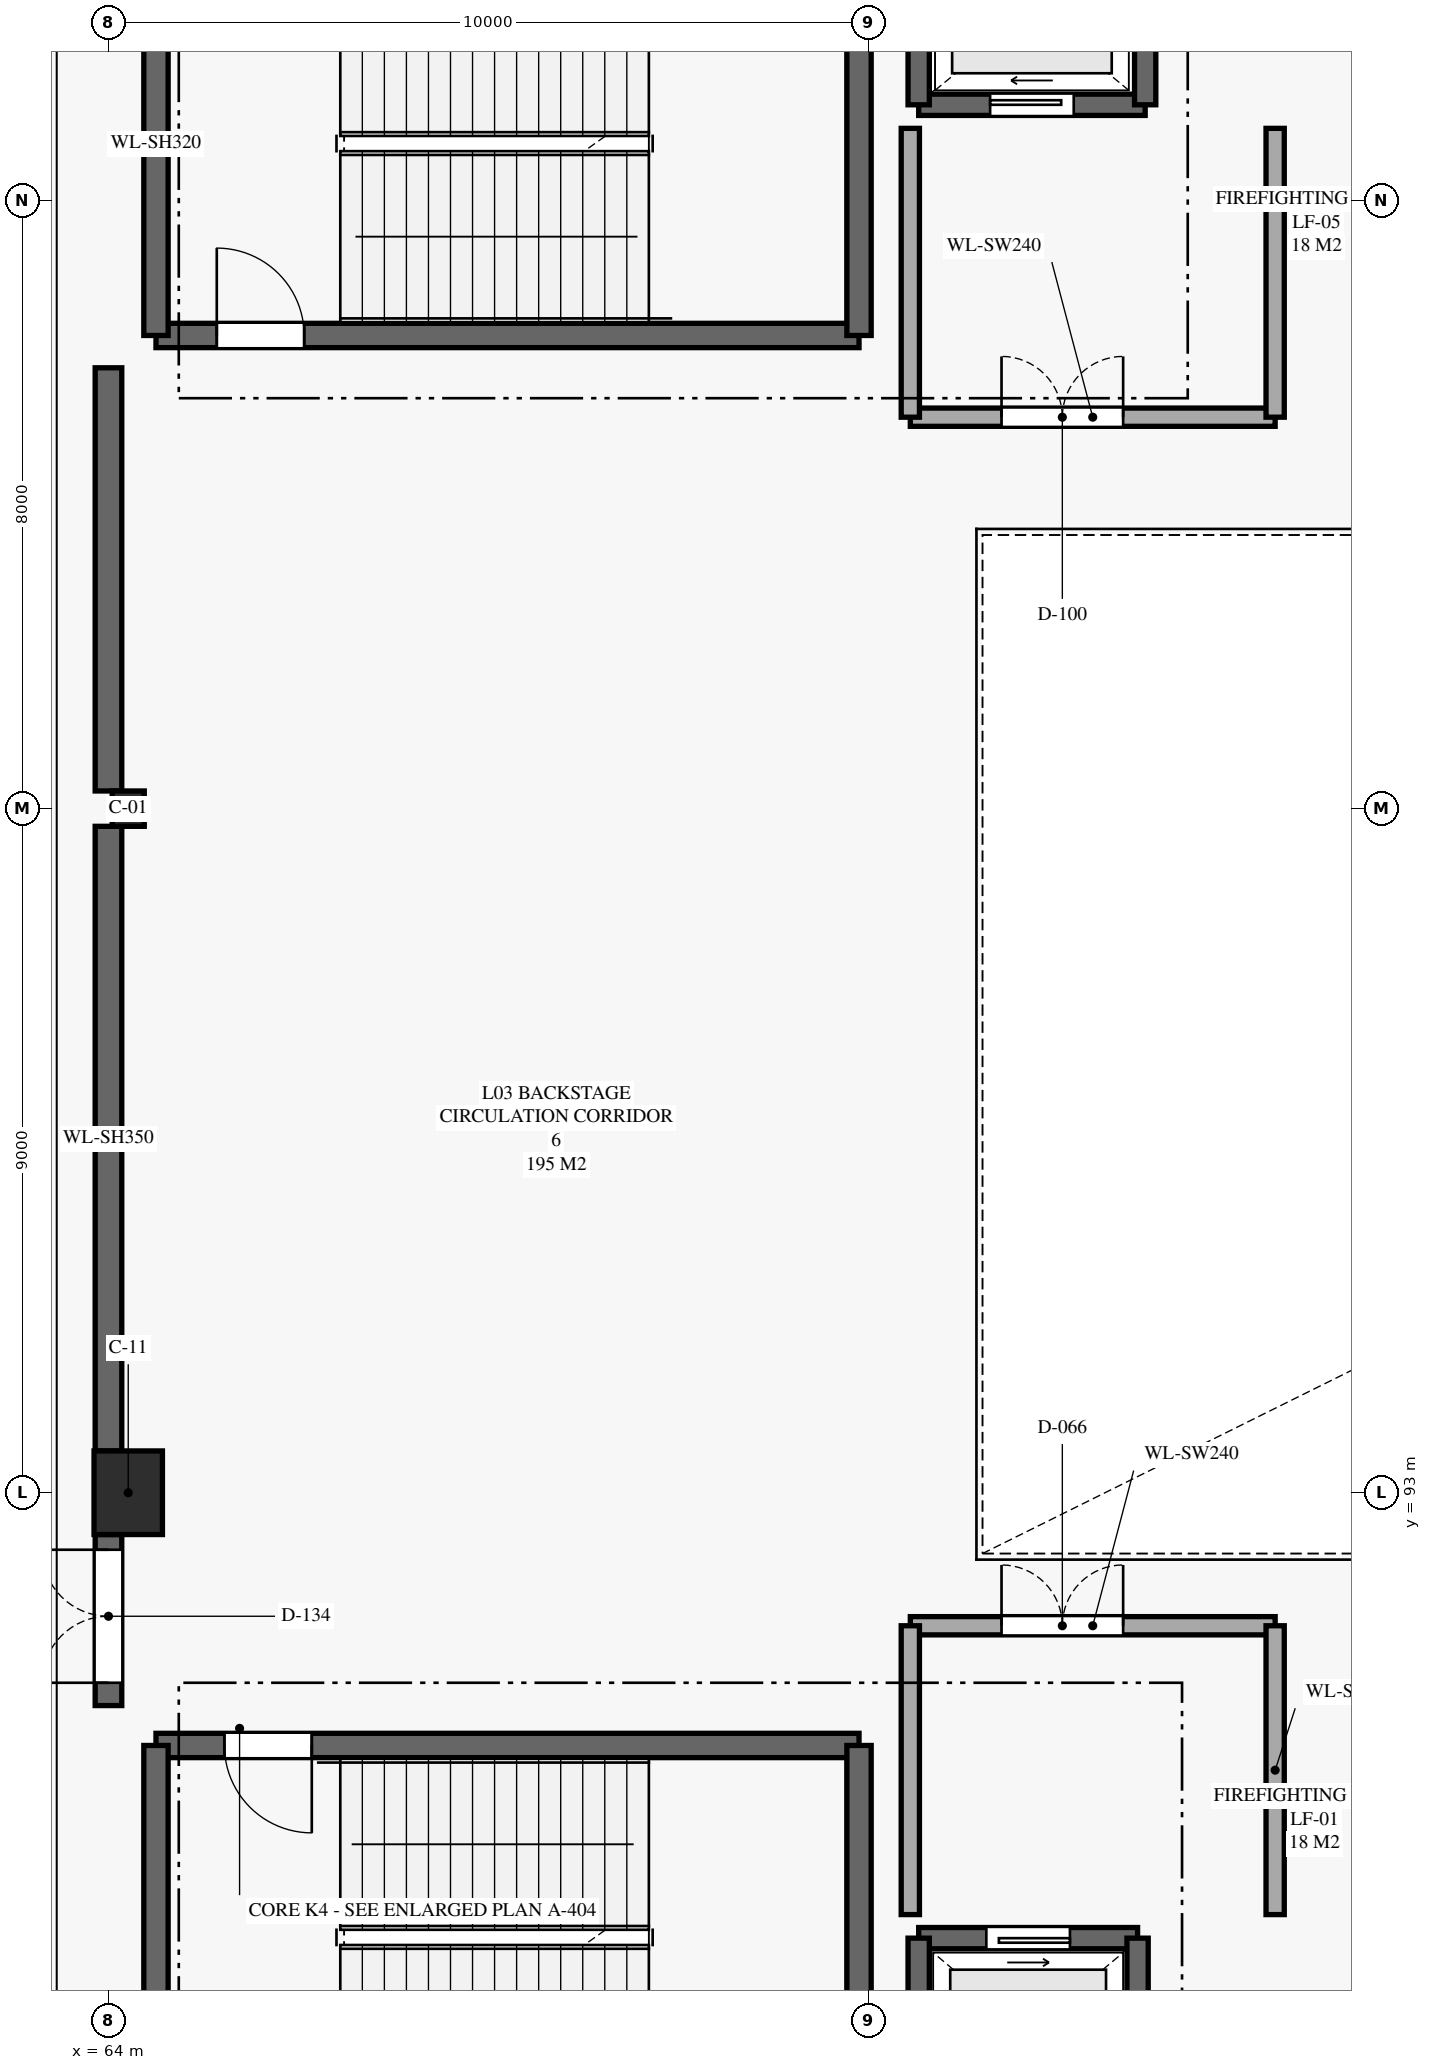
"""IFC4 building model, lengths in metres.
Left out: names, types, materials, properties, quantities, classifications, styles, units other than length and angle.
Written with IfcOpenShell. Run it as: python <this file> out.ifc"""

import sys

from ifc_helpers import new_model, si_unit, direction, frame, frame_2d, origin, origin_2d, place, context, subcontext, project, spatial, rectangle, i_section, extrude, element, fill, save


model = new_model("IFC4")
c1 = context("Model", 3, precision=1e-05, world=origin(), true_north=direction((0.0, 1.0)))
c2 = subcontext(c1, "Body", "Model", "MODEL_VIEW")
j1 = project(units=[si_unit("LENGTHUNIT", "METRE"), si_unit("PLANEANGLEUNIT", "RADIAN")], contexts=[c1])
p1 = place(None, origin())
s1 = spatial("IfcSite", under=j1, at=p1, CompositionType="ELEMENT")
p2 = place(p1, origin())
s2 = spatial("IfcBuilding", under=s1, at=p2, CompositionType="ELEMENT")
p3 = place(p2, frame((0.0, 0.0, 15.0)))
s3 = spatial("IfcBuildingStorey", under=s2, at=p3, CompositionType="ELEMENT", Elevation=15.0)
p4 = place(p3, frame((64.26, 93.0, 0.0), z_axis=(0.0, 0.0, 1.0), x_axis=(1.0, 0.0, 0.0)))
e1 = element("IfcColumn", 1, at=p4, inside=s3, PredefinedType="COLUMN", context=c2, shape_type="SweptSolid", body=[
    extrude(rectangle(XDim=0.9, YDim=1.1, at=origin_2d()), origin(), (0.0, 0.0, 1.0), 5.0),
])
p5 = place(p3, frame((64.26, 102.0, 0.0), z_axis=(0.0, 0.0, 1.0), x_axis=(1.0, 0.0, 0.0)))
e2 = element("IfcColumn", 2, at=p5, inside=s3, PredefinedType="COLUMN", context=c2, shape_type="SweptSolid", body=[
    extrude(i_section(OverallWidth=0.422, OverallDepth=0.465, WebThickness=0.045, FlangeThickness=0.073, FilletRadius=0.02, at=origin_2d()), origin(), (0.0, 0.0, 1.0), 5.0),
])
p6 = place(p3, frame((64.625, 108.225, 0.0), z_axis=(0.0, 0.0, 1.0), x_axis=(1.0, 0.0, 0.0)))
e3 = element("IfcWall", 3, at=p6, inside=s3, PredefinedType="SHEAR", context=c2, shape_type="SweptSolid", body=[
    extrude(rectangle(XDim=9.25, YDim=0.32, at=frame_2d((4.625, 0.0))), origin(), (0.0, 0.0, 1.0), 4.675),
])
p7 = place(p6, frame((0.8, 0.0, 0.0)))
e4 = element("IfcOpeningElement", 4, at=p7, cuts=e3, PredefinedType="OPENING", context=c2, shape_type="SweptSolid", body=[
    extrude(rectangle(XDim=1.15, YDim=2.2, at=frame_2d((0.575, 1.1))), frame((0.0, 0.17, 0.0), z_axis=(0.0, -1.0, 0.0), x_axis=(1.0, 0.0, 0.0)), (0.0, 0.0, 1.0), 0.34),
])
for number, where, z_axis, x_axis in (
    (5, (64.625, 113.275, 0.0), (0.0, 0.0, 1.0), (0.0, -1.0, 0.0)),
    (6, (73.875, 108.225, 0.0), (0.0, 0.0, 1.0), (0.0, 1.0, 0.0)),
):
    element("IfcWall", number, at=place(p3, frame(where, z_axis=z_axis, x_axis=x_axis)), inside=s3, PredefinedType="SHEAR", context=c2, shape_type="SweptSolid", body=[
        extrude(rectangle(XDim=5.05, YDim=0.32, at=frame_2d((2.525, 0.0))), origin(), (0.0, 0.0, 1.0), 4.675),
    ])
p8 = place(p3, frame((73.875, 89.675, 0.0), z_axis=(0.0, 0.0, 1.0), x_axis=(-1.0, 0.0, 0.0)))
e7 = element("IfcWall", 7, at=p8, inside=s3, PredefinedType="SHEAR", context=c2, shape_type="SweptSolid", body=[
    extrude(rectangle(XDim=9.25, YDim=0.32, at=frame_2d((4.625, 0.0))), origin(), (0.0, 0.0, 1.0), 4.675),
])
p9 = place(p8, frame((7.2, 0.0, 0.0)))
e8 = element("IfcOpeningElement", 8, at=p9, cuts=e7, PredefinedType="OPENING", context=c2, shape_type="SweptSolid", body=[
    extrude(rectangle(XDim=1.15, YDim=2.2, at=frame_2d((0.575, 1.1))), frame((0.0, 0.17, 0.0), z_axis=(0.0, -1.0, 0.0), x_axis=(1.0, 0.0, 0.0)), (0.0, 0.0, 1.0), 0.34),
])
for number, where, z_axis, x_axis in (
    (9, (64.625, 89.675, 0.0), (0.0, 0.0, 1.0), (0.0, -1.0, 0.0)),
    (10, (73.875, 84.625, 0.0), (0.0, 0.0, 1.0), (0.0, 1.0, 0.0)),
):
    element("IfcWall", number, at=place(p3, frame(where, z_axis=z_axis, x_axis=x_axis)), inside=s3, PredefinedType="SHEAR", context=c2, shape_type="SweptSolid", body=[
        extrude(rectangle(XDim=5.05, YDim=0.32, at=frame_2d((2.525, 0.0))), origin(), (0.0, 0.0, 1.0), 4.675),
    ])
p10 = place(p3, frame((77.54, 87.14, 0.0), z_axis=(0.0, 0.0, 1.0), x_axis=(-1.0, 0.0, 0.0)))
e11 = element("IfcWall", 11, at=p10, inside=s3, PredefinedType="SHEAR", context=c2, shape_type="SweptSolid", body=[
    extrude(rectangle(XDim=2.88, YDim=0.28, at=frame_2d((1.44, 0.0))), origin(), (0.0, 0.0, 1.0), 4.675),
])
p11 = place(p10, frame((0.89, 0.0, 0.0)))
e12 = element("IfcOpeningElement", 12, at=p11, cuts=e11, PredefinedType="OPENING", context=c2, shape_type="SweptSolid", body=[
    extrude(rectangle(XDim=1.1, YDim=2.2, at=frame_2d((0.55, 1.1))), frame((0.0, 0.15, 0.0), z_axis=(0.0, -1.0, 0.0), x_axis=(1.0, 0.0, 0.0)), (0.0, 0.0, 1.0), 0.3),
])
for number, where, z_axis, x_axis in (
    (13, (74.66, 87.14, 0.0), (0.0, 0.0, 1.0), (0.0, -1.0, 0.0)),
    (14, (77.54, 84.66, 0.0), (0.0, 0.0, 1.0), (0.0, 1.0, 0.0)),
):
    element("IfcWall", number, at=place(p3, frame(where, z_axis=z_axis, x_axis=x_axis)), inside=s3, PredefinedType="SHEAR", context=c2, shape_type="SweptSolid", body=[
        extrude(rectangle(XDim=2.48, YDim=0.28, at=frame_2d((1.24, 0.0))), origin(), (0.0, 0.0, 1.0), 4.675),
    ])
p12 = place(p3, frame((74.55, 91.25, 0.0), z_axis=(0.0, 0.0, 1.0), x_axis=(1.0, 0.0, 0.0)))
e15 = element("IfcWall", 15, at=p12, inside=s3, PredefinedType="SOLIDWALL", context=c2, shape_type="SweptSolid", body=[
    extrude(rectangle(XDim=4.8, YDim=0.24, at=frame_2d((2.4, 0.0))), origin(), (0.0, 0.0, 1.0), 4.675),
])
p13 = place(p12, frame((1.2, 0.0, 0.0)))
e16 = element("IfcOpeningElement", 16, at=p13, cuts=e15, PredefinedType="OPENING", context=c2, shape_type="SweptSolid", body=[
    extrude(rectangle(XDim=1.6, YDim=2.2, at=frame_2d((0.8, 1.1))), frame((0.0, 0.13, 0.0), z_axis=(0.0, -1.0, 0.0), x_axis=(1.0, 0.0, 0.0)), (0.0, 0.0, 1.0), 0.26),
])
for number, where, z_axis, x_axis in (
    (17, (74.55, 91.25, 0.0), (0.0, 0.0, 1.0), (0.0, -1.0, 0.0)),
    (18, (79.35, 87.45, 0.0), (0.0, 0.0, 1.0), (0.0, 1.0, 0.0)),
):
    element("IfcWall", number, at=place(p3, frame(where, z_axis=z_axis, x_axis=x_axis)), inside=s3, PredefinedType="SOLIDWALL", context=c2, shape_type="SweptSolid", body=[
        extrude(rectangle(XDim=3.8, YDim=0.24, at=frame_2d((1.9, 0.0))), origin(), (0.0, 0.0, 1.0), 4.675),
    ])
p14 = place(p3, frame((74.66, 111.26, 0.0), z_axis=(0.0, 0.0, 1.0), x_axis=(1.0, 0.0, 0.0)))
e19 = element("IfcWall", 19, at=p14, inside=s3, PredefinedType="SHEAR", context=c2, shape_type="SweptSolid", body=[
    extrude(rectangle(XDim=2.98, YDim=0.28, at=frame_2d((1.49, 0.0))), origin(), (0.0, 0.0, 1.0), 4.675),
])
p15 = place(p14, frame((0.94, 0.0, 0.0)))
e20 = element("IfcOpeningElement", 20, at=p15, cuts=e19, PredefinedType="OPENING", context=c2, shape_type="SweptSolid", body=[
    extrude(rectangle(XDim=1.1, YDim=2.2, at=frame_2d((0.55, 1.1))), frame((0.0, 0.15, 0.0), z_axis=(0.0, -1.0, 0.0), x_axis=(1.0, 0.0, 0.0)), (0.0, 0.0, 1.0), 0.3),
])
for number, where, z_axis, x_axis in (
    (21, (74.66, 113.74, 0.0), (0.0, 0.0, 1.0), (0.0, -1.0, 0.0)),
    (22, (77.64, 111.26, 0.0), (0.0, 0.0, 1.0), (0.0, 1.0, 0.0)),
):
    element("IfcWall", number, at=place(p3, frame(where, z_axis=z_axis, x_axis=x_axis)), inside=s3, PredefinedType="SHEAR", context=c2, shape_type="SweptSolid", body=[
        extrude(rectangle(XDim=2.48, YDim=0.28, at=frame_2d((1.24, 0.0))), origin(), (0.0, 0.0, 1.0), 4.675),
    ])
p16 = place(p3, frame((74.55, 107.15, 0.0), z_axis=(0.0, 0.0, 1.0), x_axis=(1.0, 0.0, 0.0)))
e23 = element("IfcWall", 23, at=p16, inside=s3, PredefinedType="SOLIDWALL", context=c2, shape_type="SweptSolid", body=[
    extrude(rectangle(XDim=4.8, YDim=0.24, at=frame_2d((2.4, 0.0))), origin(), (0.0, 0.0, 1.0), 4.675),
])
p17 = place(p16, frame((1.2, 0.0, 0.0)))
e24 = element("IfcOpeningElement", 24, at=p17, cuts=e23, PredefinedType="OPENING", context=c2, shape_type="SweptSolid", body=[
    extrude(rectangle(XDim=1.6, YDim=2.2, at=frame_2d((0.8, 1.1))), frame((0.0, 0.13, 0.0), z_axis=(0.0, -1.0, 0.0), x_axis=(1.0, 0.0, 0.0)), (0.0, 0.0, 1.0), 0.26),
])
for number, where, z_axis, x_axis in (
    (25, (74.55, 110.95, 0.0), (0.0, 0.0, 1.0), (0.0, -1.0, 0.0)),
    (26, (79.35, 107.15, 0.0), (0.0, 0.0, 1.0), (0.0, 1.0, 0.0)),
):
    element("IfcWall", number, at=place(p3, frame(where, z_axis=z_axis, x_axis=x_axis)), inside=s3, PredefinedType="SOLIDWALL", context=c2, shape_type="SweptSolid", body=[
        extrude(rectangle(XDim=3.8, YDim=0.24, at=frame_2d((1.9, 0.0))), origin(), (0.0, 0.0, 1.0), 4.675),
    ])
p18 = place(p3, frame((64.0, 90.2, 0.0), z_axis=(0.0, 0.0, 1.0), x_axis=(0.0, 1.0, 0.0)))
e27 = element("IfcWall", 27, at=p18, inside=s3, PredefinedType="SHEAR", context=c2, shape_type="SweptSolid", body=[
    extrude(rectangle(XDim=2.25, YDim=0.35, at=frame_2d((1.125, 0.0))), origin(), (0.0, 0.0, 1.0), 4.675),
])
p19 = place(p18, frame((0.3, 0.0, 0.0)))
e28 = element("IfcOpeningElement", 28, at=p19, cuts=e27, PredefinedType="OPENING", context=c2, shape_type="SweptSolid", body=[
    extrude(rectangle(XDim=1.75, YDim=2.2, at=frame_2d((0.875, 1.1))), frame((0.0, 0.185, 0.0), z_axis=(0.0, -1.0, 0.0), x_axis=(1.0, 0.0, 0.0)), (0.0, 0.0, 1.0), 0.37),
])
p20 = place(p3, frame((64.0, 93.55, 0.0), z_axis=(0.0, 0.0, 1.0), x_axis=(0.0, 1.0, 0.0)))
e29 = element("IfcWall", 29, at=p20, inside=s3, PredefinedType="SHEAR", context=c2, shape_type="SweptSolid", body=[
    extrude(rectangle(XDim=8.218, YDim=0.35, at=frame_2d((4.109, 0.0))), origin(), (0.0, 0.0, 1.0), 4.675),
])
p21 = place(p3, frame((64.0, 102.232, 0.0), z_axis=(0.0, 0.0, 1.0), x_axis=(0.0, 1.0, 0.0)))
e30 = element("IfcWall", 30, at=p21, inside=s3, PredefinedType="SHEAR", context=c2, shape_type="SweptSolid", body=[
    extrude(rectangle(XDim=5.568, YDim=0.35, at=frame_2d((2.784, 0.0))), origin(), (0.0, 0.0, 1.0), 4.675),
])
p22 = place(p7, origin())
e31 = element("IfcDoor", 31, at=p22, inside=s3, OperationType="SINGLE_SWING_LEFT", PredefinedType="DOOR", context=c2, shape_type="SweptSolid", body=[
    extrude(rectangle(XDim=1.15, YDim=2.2, at=frame_2d((0.575, 1.1))), frame((0.0, 0.025, 0.0), z_axis=(0.0, -1.0, 0.0), x_axis=(1.0, 0.0, 0.0)), (0.0, 0.0, 1.0), 0.05),
])
fill(e4, e31)
p23 = place(p9, origin())
e32 = element("IfcDoor", 32, at=p23, inside=s3, OperationType="SINGLE_SWING_LEFT", PredefinedType="DOOR", context=c2, shape_type="SweptSolid", body=[
    extrude(rectangle(XDim=1.15, YDim=2.2, at=frame_2d((0.575, 1.1))), frame((0.0, 0.025, 0.0), z_axis=(0.0, -1.0, 0.0), x_axis=(1.0, 0.0, 0.0)), (0.0, 0.0, 1.0), 0.05),
])
fill(e8, e32)
p24 = place(p11, origin())
e33 = element("IfcDoor", 33, at=p24, inside=s3, OperationType="SLIDING_TO_LEFT", PredefinedType="DOOR", context=c2, shape_type="SweptSolid", body=[
    extrude(rectangle(XDim=1.1, YDim=2.2, at=frame_2d((0.55, 1.1))), frame((0.0, 0.025, 0.0), z_axis=(0.0, -1.0, 0.0), x_axis=(1.0, 0.0, 0.0)), (0.0, 0.0, 1.0), 0.05),
])
fill(e12, e33)
p25 = place(p13, origin())
e34 = element("IfcDoor", 34, at=p25, inside=s3, OperationType="DOUBLE_DOOR_SINGLE_SWING", PredefinedType="DOOR", context=c2, shape_type="SweptSolid", body=[
    extrude(rectangle(XDim=1.6, YDim=2.2, at=frame_2d((0.8, 1.1))), frame((0.0, 0.025, 0.0), z_axis=(0.0, -1.0, 0.0), x_axis=(1.0, 0.0, 0.0)), (0.0, 0.0, 1.0), 0.05),
])
fill(e16, e34)
p26 = place(p15, origin())
e35 = element("IfcDoor", 35, at=p26, inside=s3, OperationType="SLIDING_TO_LEFT", PredefinedType="DOOR", context=c2, shape_type="SweptSolid", body=[
    extrude(rectangle(XDim=1.1, YDim=2.2, at=frame_2d((0.55, 1.1))), frame((0.0, 0.025, 0.0), z_axis=(0.0, -1.0, 0.0), x_axis=(1.0, 0.0, 0.0)), (0.0, 0.0, 1.0), 0.05),
])
fill(e20, e35)
p27 = place(p17, origin())
e36 = element("IfcDoor", 36, at=p27, inside=s3, OperationType="DOUBLE_DOOR_SINGLE_SWING", PredefinedType="DOOR", context=c2, shape_type="SweptSolid", body=[
    extrude(rectangle(XDim=1.6, YDim=2.2, at=frame_2d((0.8, 1.1))), frame((0.0, 0.025, 0.0), z_axis=(0.0, -1.0, 0.0), x_axis=(1.0, 0.0, 0.0)), (0.0, 0.0, 1.0), 0.05),
])
fill(e24, e36)
p28 = place(p19, origin())
e37 = element("IfcDoor", 37, at=p28, inside=s3, OperationType="DOUBLE_DOOR_SINGLE_SWING", PredefinedType="DOOR", context=c2, shape_type="SweptSolid", body=[
    extrude(rectangle(XDim=1.75, YDim=2.2, at=frame_2d((0.875, 1.1))), frame((0.0, 0.025, 0.0), z_axis=(0.0, -1.0, 0.0), x_axis=(1.0, 0.0, 0.0)), (0.0, 0.0, 1.0), 0.05),
])
fill(e28, e37)
save(model, sys.argv[1])
